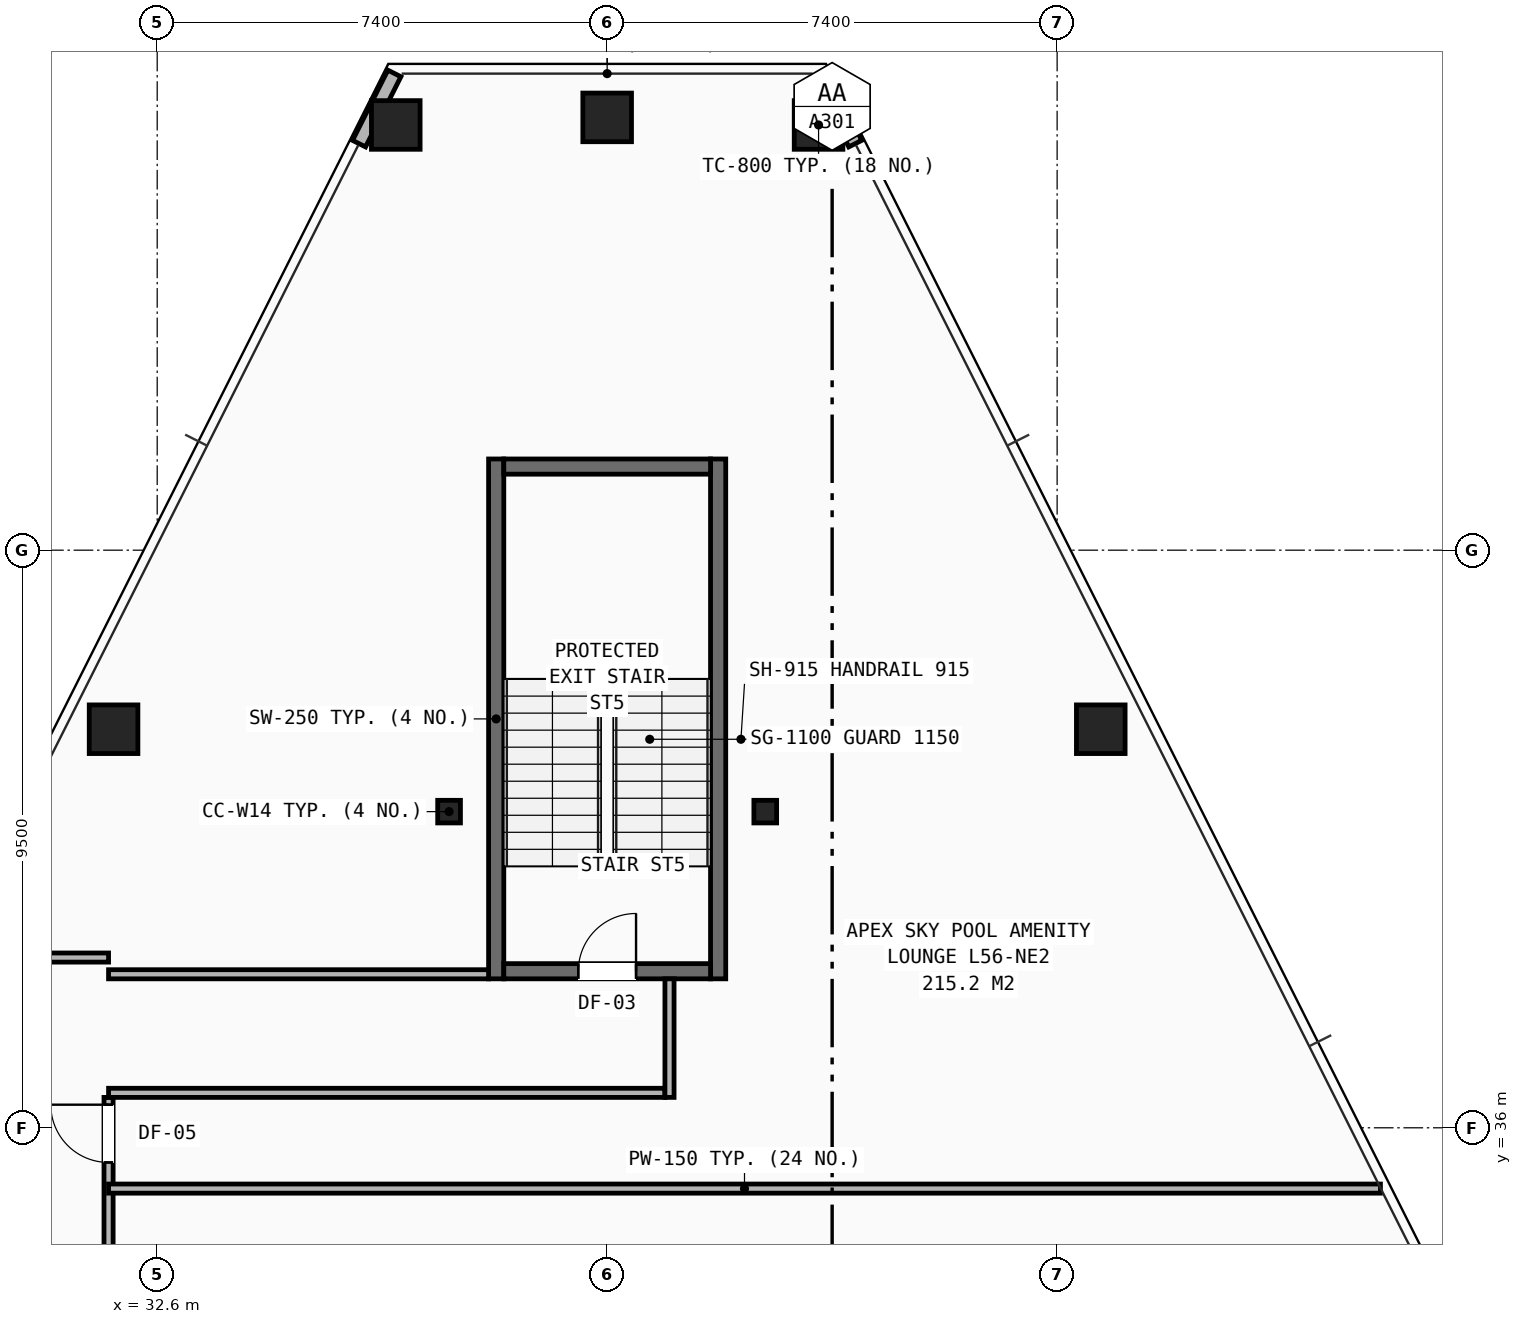
"""IFC4 building model, lengths in metres.
Left out: names, types, materials, properties, quantities, classifications, styles, units other than length and angle.
Written with IfcOpenShell. Run it as: python <this file> out.ifc"""

import sys

from ifc_helpers import new_model, si_unit, direction, frame, frame_2d, origin, origin_2d, place, context, subcontext, project, spatial, rectangle, hollow_rectangle, i_section, extrude, element, fill, save


model = new_model("IFC4")
c1 = context("Model", 3, precision=1e-05, world=origin(), true_north=direction((0.0, 1.0)))
c2 = subcontext(c1, "Body", "Model", "MODEL_VIEW")
j1 = project(units=[si_unit("LENGTHUNIT", "METRE"), si_unit("PLANEANGLEUNIT", "RADIAN")], contexts=[c1])
p1 = place(None, origin())
s1 = spatial("IfcSite", under=j1, at=p1, CompositionType="ELEMENT")
p2 = place(p1, origin())
s2 = spatial("IfcBuilding", under=s1, at=p2, CompositionType="ELEMENT")
p3 = place(p2, frame((0.0, 0.0, 196.5)))
s3 = spatial("IfcBuildingStorey", under=s2, at=p3, CompositionType="ELEMENT", Elevation=196.5)
for number, where, z_axis, x_axis in (
    (1, (37.4, 41.2, 0.0), (0.0, 0.0, 1.0), (1.0, 0.0, 0.0)),
    (2, (42.6, 41.2, 0.0), (0.0, 0.0, 1.0), (1.0, 0.0, 0.0)),
):
    element("IfcColumn", number, at=place(p3, frame(where, z_axis=z_axis, x_axis=x_axis)), inside=s3, PredefinedType="COLUMN", context=c2, shape_type="SweptSolid", body=[
        extrude(i_section(OverallWidth=0.374, OverallDepth=0.372, WebThickness=0.016, FlangeThickness=0.026, at=origin_2d()), origin(), (0.0, 0.0, 1.0), 4.2),
    ])
for number, where, z_axis, x_axis in (
    (3, (43.477, 52.493, 0.0), (0.0, 0.0, 1.0), (1.0, 0.0, 0.0)),
    (4, (40.0, 52.618, 0.0), (0.0, 0.0, 1.0), (1.0, 0.0, 0.0)),
    (5, (36.523, 52.493, 0.0), (0.0, 0.0, 1.0), (1.0, 0.0, 0.0)),
    (6, (31.882, 42.555, 0.0), (0.0, 0.0, 1.0), (1.0, 0.0, 0.0)),
    (7, (48.118, 42.555, 0.0), (0.0, 0.0, 1.0), (1.0, 0.0, 0.0)),
):
    element("IfcColumn", number, at=place(p3, frame(where, z_axis=z_axis, x_axis=x_axis)), inside=s3, PredefinedType="COLUMN", context=c2, shape_type="SweptSolid", body=[
        extrude(hollow_rectangle(XDim=0.8, YDim=0.8, WallThickness=0.055, at=origin_2d()), origin(), (0.0, 0.0, 1.0), 4.2),
    ])
for number, where, z_axis, x_axis in (
    (8, (36.5, 53.341, 0.0), (0.0, 0.0, 1.0), (-0.449, -0.893, 0.0)),
    (9, (44.08, 52.186, 0.0), (0.0, 0.0, 1.0), (-0.449, 0.893, 0.0)),
):
    element("IfcWall", number, at=place(p3, frame(where, z_axis=z_axis, x_axis=x_axis)), inside=s3, PredefinedType="SHEAR", context=c2, shape_type="SweptSolid", body=[
        extrude(rectangle(XDim=1.293, YDim=0.24, at=frame_2d((0.646, 0.0))), origin(), (0.0, 0.0, 1.0), 3.313),
    ])
p4 = place(p3, frame((31.8, 31.2, 0.0), z_axis=(0.0, 0.0, 1.0), x_axis=(0.0, 1.0, 0.0)))
e10 = element("IfcWall", 10, at=p4, inside=s3, PredefinedType="PARTITIONING", context=c2, shape_type="SweptSolid", body=[
    extrude(rectangle(XDim=5.3, YDim=0.15, at=frame_2d((2.65, 0.0))), origin(), (0.0, 0.0, 1.0), 2.955),
])
p5 = place(p4, frame((0.5, 0.0, 0.0)))
e11 = element("IfcOpeningElement", 11, at=p5, cuts=e10, PredefinedType="OPENING", context=c2, shape_type="SweptSolid", body=[
    extrude(rectangle(XDim=0.95, YDim=2.1, at=frame_2d((0.475, 1.05))), frame((0.0, 0.085, 0.0), z_axis=(0.0, -1.0, 0.0), x_axis=(1.0, 0.0, 0.0)), (0.0, 0.0, 1.0), 0.17),
])
p6 = place(p4, frame((4.23, 0.0, 0.0)))
e12 = element("IfcOpeningElement", 12, at=p6, cuts=e10, PredefinedType="OPENING", context=c2, shape_type="SweptSolid", body=[
    extrude(rectangle(XDim=0.95, YDim=2.1, at=frame_2d((0.475, 1.05))), frame((0.0, 0.085, 0.0), z_axis=(0.0, -1.0, 0.0), x_axis=(1.0, 0.0, 0.0)), (0.0, 0.0, 1.0), 0.17),
])
p7 = place(p3, frame((29.6, 38.8, 0.0), z_axis=(0.0, 0.0, 1.0), x_axis=(1.0, 0.0, 0.0)))
e13 = element("IfcWall", 13, at=p7, inside=s3, PredefinedType="PARTITIONING", context=c2, shape_type="SweptSolid", body=[
    extrude(rectangle(XDim=2.2, YDim=0.15, at=frame_2d((1.1, 0.0))), origin(), (0.0, 0.0, 1.0), 3.319),
])
p8 = place(p3, frame((31.8, 35.0, 0.0), z_axis=(0.0, 0.0, 1.0), x_axis=(1.0, 0.0, 0.0)))
e14 = element("IfcWall", 14, at=p8, inside=s3, PredefinedType="PARTITIONING", context=c2, shape_type="SweptSolid", body=[
    extrude(rectangle(XDim=20.917, YDim=0.15, at=frame_2d((10.458, 0.0))), origin(), (0.0, 0.0, 1.0), 3.319),
])
for number, where, z_axis, x_axis in (
    (15, (38.175, 38.45, 0.0), (0.0, 0.0, 1.0), (0.0, 1.0, 0.0)),
    (16, (41.825, 38.45, 0.0), (0.0, 0.0, 1.0), (0.0, 1.0, 0.0)),
):
    element("IfcWall", number, at=place(p3, frame(where, z_axis=z_axis, x_axis=x_axis)), inside=s3, PredefinedType="SHEAR", context=c2, shape_type="SweptSolid", body=[
        extrude(rectangle(XDim=8.55, YDim=0.25, at=frame_2d((4.275, 0.0))), origin(), (0.0, 0.0, 1.0), 3.94),
    ])
p9 = place(p3, frame((38.3, 38.575, 0.0), z_axis=(0.0, 0.0, 1.0), x_axis=(1.0, 0.0, 0.0)))
e17 = element("IfcWall", 17, at=p9, inside=s3, PredefinedType="SHEAR", context=c2, shape_type="SweptSolid", body=[
    extrude(rectangle(XDim=3.4, YDim=0.25, at=frame_2d((1.7, 0.0))), origin(), (0.0, 0.0, 1.0), 3.94),
])
p10 = place(p9, frame((1.225, 0.0, 0.0)))
e18 = element("IfcOpeningElement", 18, at=p10, cuts=e17, PredefinedType="OPENING", context=c2, shape_type="SweptSolid", body=[
    extrude(rectangle(XDim=0.95, YDim=2.1, at=frame_2d((0.475, 1.05))), frame((0.0, 0.135, 0.0), z_axis=(0.0, -1.0, 0.0), x_axis=(1.0, 0.0, 0.0)), (0.0, 0.0, 1.0), 0.27),
])
p11 = place(p3, frame((38.3, 46.875, 0.0), z_axis=(0.0, 0.0, 1.0), x_axis=(1.0, 0.0, 0.0)))
e19 = element("IfcWall", 19, at=p11, inside=s3, PredefinedType="SHEAR", context=c2, shape_type="SweptSolid", body=[
    extrude(rectangle(XDim=3.4, YDim=0.25, at=frame_2d((1.7, 0.0))), origin(), (0.0, 0.0, 1.0), 3.94),
])
p12 = place(p3, frame((31.8, 36.575, 0.0), z_axis=(0.0, 0.0, 1.0), x_axis=(1.0, 0.0, 0.0)))
e20 = element("IfcWall", 20, at=p12, inside=s3, PredefinedType="PARTITIONING", context=c2, shape_type="SweptSolid", body=[
    extrude(rectangle(XDim=9.15, YDim=0.15, at=frame_2d((4.575, 0.0))), origin(), (0.0, 0.0, 1.0), 3.523),
])
p13 = place(p3, frame((31.8, 38.525, 0.0), z_axis=(0.0, 0.0, 1.0), x_axis=(1.0, 0.0, 0.0)))
e21 = element("IfcWall", 21, at=p13, inside=s3, PredefinedType="PARTITIONING", context=c2, shape_type="SweptSolid", body=[
    extrude(rectangle(XDim=6.25, YDim=0.15, at=frame_2d((3.125, 0.0))), origin(), (0.0, 0.0, 1.0), 3.523),
])
p14 = place(p3, frame((41.025, 36.5, 0.0), z_axis=(0.0, 0.0, 1.0), x_axis=(0.0, 1.0, 0.0)))
e22 = element("IfcWall", 22, at=p14, inside=s3, PredefinedType="PARTITIONING", context=c2, shape_type="SweptSolid", body=[
    extrude(rectangle(XDim=1.95, YDim=0.15, at=frame_2d((0.975, 0.0))), origin(), (0.0, 0.0, 1.0), 3.94),
])
p15 = place(p6, origin())
e23 = element("IfcDoor", 23, at=p15, inside=s3, OperationType="SINGLE_SWING_RIGHT", PredefinedType="DOOR", context=c2, shape_type="SweptSolid", body=[
    extrude(rectangle(XDim=0.95, YDim=2.1, at=frame_2d((0.475, 1.05))), frame((0.0, 0.025, 0.0), z_axis=(0.0, -1.0, 0.0), x_axis=(1.0, 0.0, 0.0)), (0.0, 0.0, 1.0), 0.05),
])
fill(e12, e23)
p16 = place(p10, origin())
e24 = element("IfcDoor", 24, at=p16, inside=s3, OperationType="SINGLE_SWING_RIGHT", PredefinedType="DOOR", context=c2, shape_type="SweptSolid", body=[
    extrude(rectangle(XDim=0.95, YDim=2.1, at=frame_2d((0.475, 1.05))), frame((0.0, 0.025, 0.0), z_axis=(0.0, -1.0, 0.0), x_axis=(1.0, 0.0, 0.0)), (0.0, 0.0, 1.0), 0.05),
])
fill(e18, e24)
save(model, sys.argv[1])
